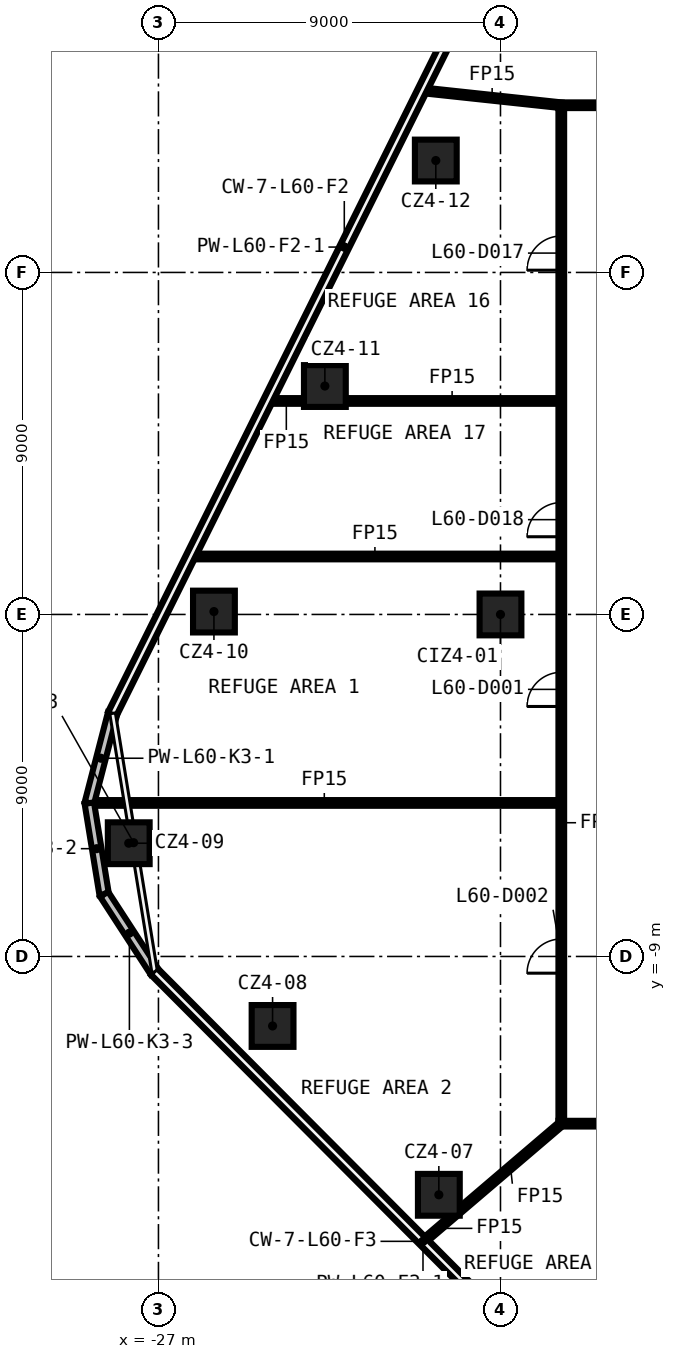
"""IFC4 building model, lengths in metres.
Left out: names, types, materials, properties, quantities, classifications, styles, units other than length and angle.
Written with IfcOpenShell. Run it as: python <this file> out.ifc"""

import sys

from ifc_helpers import new_model, si_unit, direction, frame, frame_2d, origin, origin_2d, place, context, subcontext, project, spatial, rectangle, extrude, element, fill, save


model = new_model("IFC4")
c1 = context("Model", 3, precision=1e-05, world=origin(), true_north=direction((0.0, 1.0)))
c2 = subcontext(c1, "Body", "Model", "MODEL_VIEW")
j1 = project(units=[si_unit("LENGTHUNIT", "METRE"), si_unit("PLANEANGLEUNIT", "RADIAN")], contexts=[c1])
p1 = place(None, origin())
s1 = spatial("IfcSite", under=j1, at=p1, CompositionType="ELEMENT")
p2 = place(p1, origin())
s2 = spatial("IfcBuilding", under=s1, at=p2, CompositionType="ELEMENT")
p3 = place(p2, frame((0.0, 0.0, 283.2)))
s3 = spatial("IfcBuildingStorey", under=s2, at=p3, CompositionType="ELEMENT", Elevation=283.2)
for number, where, z_axis, x_axis in (
    (1, (-19.622, -15.272, 0.0), (0.0, 0.0, 1.0), (1.0, 0.0, 0.0)),
    (2, (-23.997, -10.829, 0.0), (0.0, 0.0, 1.0), (1.0, 0.0, 0.0)),
    (3, (-27.782, -6.02, 0.0), (0.0, 0.0, 1.0), (1.0, 0.0, 0.0)),
    (4, (-25.54, 0.076, 0.0), (0.0, 0.0, 1.0), (1.0, 0.0, 0.0)),
    (5, (-22.621, 6.011, 0.0), (0.0, 0.0, 1.0), (1.0, 0.0, 0.0)),
    (6, (-19.702, 11.945, 0.0), (0.0, 0.0, 1.0), (1.0, 0.0, 0.0)),
    (7, (-18.0, 0.0, 0.0), (0.0, 0.0, 1.0), (1.0, 0.0, 0.0)),
):
    element("IfcColumn", number, at=place(p3, frame(where, z_axis=z_axis, x_axis=x_axis)), inside=s3, PredefinedType="COLUMN", context=c2, shape_type="SweptSolid", body=[
        extrude(rectangle(XDim=1.1, YDim=1.1, at=origin_2d()), origin(), (0.0, 0.0, 1.0), 5.55),
    ])
p4 = place(p3, frame((16.475, -13.4, 0.0), z_axis=(0.0, 0.0, 1.0), x_axis=(-1.0, 0.0, 0.0)))
e8 = element("IfcWall", 8, at=p4, inside=s3, PredefinedType="PARTITIONING", context=c2, shape_type="SweptSolid", body=[
    extrude(rectangle(XDim=32.95, YDim=0.15, at=frame_2d((16.475, 0.0))), origin(), (0.0, 0.0, 1.0), 5.55),
])
p5 = place(p4, frame((30.159, 0.0, 0.0)))
e9 = element("IfcOpeningElement", 9, at=p5, cuts=e8, PredefinedType="OPENING", context=c2, shape_type="SweptSolid", body=[
    extrude(rectangle(XDim=0.9, YDim=2.1, at=frame_2d((0.45, 1.05))), frame((0.0, 0.085, 0.0), z_axis=(0.0, -1.0, 0.0), x_axis=(1.0, 0.0, 0.0)), (0.0, 0.0, 1.0), 0.17),
])
p6 = place(p4, frame((24.091, 0.0, 0.0)))
e10 = element("IfcOpeningElement", 10, at=p6, cuts=e8, PredefinedType="OPENING", context=c2, shape_type="SweptSolid", body=[
    extrude(rectangle(XDim=0.9, YDim=2.1, at=frame_2d((0.45, 1.05))), frame((0.0, 0.085, 0.0), z_axis=(0.0, -1.0, 0.0), x_axis=(1.0, 0.0, 0.0)), (0.0, 0.0, 1.0), 0.17),
])
p7 = place(p4, frame((17.454, 0.0, 0.0)))
e11 = element("IfcOpeningElement", 11, at=p7, cuts=e8, PredefinedType="OPENING", context=c2, shape_type="SweptSolid", body=[
    extrude(rectangle(XDim=0.9, YDim=2.1, at=frame_2d((0.45, 1.05))), frame((0.0, 0.085, 0.0), z_axis=(0.0, -1.0, 0.0), x_axis=(1.0, 0.0, 0.0)), (0.0, 0.0, 1.0), 0.17),
])
p8 = place(p4, frame((12.504, 0.0, 0.0)))
e12 = element("IfcOpeningElement", 12, at=p8, cuts=e8, PredefinedType="OPENING", context=c2, shape_type="SweptSolid", body=[
    extrude(rectangle(XDim=0.9, YDim=2.1, at=frame_2d((0.45, 1.05))), frame((0.0, 0.085, 0.0), z_axis=(0.0, -1.0, 0.0), x_axis=(1.0, 0.0, 0.0)), (0.0, 0.0, 1.0), 0.17),
])
p9 = place(p4, frame((7.554, 0.0, 0.0)))
e13 = element("IfcOpeningElement", 13, at=p9, cuts=e8, PredefinedType="OPENING", context=c2, shape_type="SweptSolid", body=[
    extrude(rectangle(XDim=0.9, YDim=2.1, at=frame_2d((0.45, 1.05))), frame((0.0, 0.085, 0.0), z_axis=(0.0, -1.0, 0.0), x_axis=(1.0, 0.0, 0.0)), (0.0, 0.0, 1.0), 0.17),
])
p10 = place(p4, frame((2.438, 0.0, 0.0)))
e14 = element("IfcOpeningElement", 14, at=p10, cuts=e8, PredefinedType="OPENING", context=c2, shape_type="SweptSolid", body=[
    extrude(rectangle(XDim=0.9, YDim=2.1, at=frame_2d((0.45, 1.05))), frame((0.0, 0.085, 0.0), z_axis=(0.0, -1.0, 0.0), x_axis=(1.0, 0.0, 0.0)), (0.0, 0.0, 1.0), 0.17),
])
p11 = place(p3, frame((-28.797, -4.96, 0.0), z_axis=(0.0, 0.0, 1.0), x_axis=(1.0, 0.0, 0.0)))
e15 = element("IfcWall", 15, at=p11, inside=s3, PredefinedType="PARTITIONING", context=c2, shape_type="SweptSolid", body=[
    extrude(rectangle(XDim=12.322, YDim=0.15, at=frame_2d((6.161, 0.0))), origin(), (0.0, 0.0, 1.0), 5.55),
])
p12 = place(p3, frame((-26.133, 1.525, 0.0), z_axis=(0.0, 0.0, 1.0), x_axis=(1.0, 0.0, 0.0)))
e16 = element("IfcWall", 16, at=p12, inside=s3, PredefinedType="PARTITIONING", context=c2, shape_type="SweptSolid", body=[
    extrude(rectangle(XDim=9.658, YDim=0.15, at=frame_2d((4.829, 0.0))), origin(), (0.0, 0.0, 1.0), 5.55),
])
p13 = place(p3, frame((-24.099, 5.618, 0.0), z_axis=(0.0, 0.0, 1.0), x_axis=(1.0, 0.0, 0.0)))
e17 = element("IfcWall", 17, at=p13, inside=s3, PredefinedType="PARTITIONING", context=c2, shape_type="SweptSolid", body=[
    extrude(rectangle(XDim=0.928, YDim=0.15, at=frame_2d((0.464, 0.0))), origin(), (0.0, 0.0, 1.0), 5.55),
])
p14 = place(p3, frame((-22.071, 5.618, 0.0), z_axis=(0.0, 0.0, 1.0), x_axis=(1.0, 0.0, 0.0)))
e18 = element("IfcWall", 18, at=p14, inside=s3, PredefinedType="PARTITIONING", context=c2, shape_type="SweptSolid", body=[
    extrude(rectangle(XDim=5.596, YDim=0.15, at=frame_2d((2.798, 0.0))), origin(), (0.0, 0.0, 1.0), 5.55),
])
p15 = place(p3, frame((-16.475, 13.4, 0.0), z_axis=(0.0, 0.0, 1.0), x_axis=(1.0, 0.0, 0.0)))
e19 = element("IfcWall", 19, at=p15, inside=s3, PredefinedType="PARTITIONING", context=c2, shape_type="SweptSolid", body=[
    extrude(rectangle(XDim=32.95, YDim=0.15, at=frame_2d((16.475, 0.0))), origin(), (0.0, 0.0, 1.0), 5.55),
])
p16 = place(p15, frame((23.297, 0.0, 0.0)))
e20 = element("IfcOpeningElement", 20, at=p16, cuts=e19, PredefinedType="OPENING", context=c2, shape_type="SweptSolid", body=[
    extrude(rectangle(XDim=0.9, YDim=2.1, at=frame_2d((0.45, 1.05))), frame((0.0, 0.085, 0.0), z_axis=(0.0, -1.0, 0.0), x_axis=(1.0, 0.0, 0.0)), (0.0, 0.0, 1.0), 0.17),
])
p17 = place(p15, frame((17.452, 0.0, 0.0)))
e21 = element("IfcOpeningElement", 21, at=p17, cuts=e19, PredefinedType="OPENING", context=c2, shape_type="SweptSolid", body=[
    extrude(rectangle(XDim=0.9, YDim=2.1, at=frame_2d((0.45, 1.05))), frame((0.0, 0.085, 0.0), z_axis=(0.0, -1.0, 0.0), x_axis=(1.0, 0.0, 0.0)), (0.0, 0.0, 1.0), 0.17),
])
p18 = place(p15, frame((14.179, 0.0, 0.0)))
e22 = element("IfcOpeningElement", 22, at=p18, cuts=e19, PredefinedType="OPENING", context=c2, shape_type="SweptSolid", body=[
    extrude(rectangle(XDim=0.9, YDim=2.1, at=frame_2d((0.45, 1.05))), frame((0.0, 0.085, 0.0), z_axis=(0.0, -1.0, 0.0), x_axis=(1.0, 0.0, 0.0)), (0.0, 0.0, 1.0), 0.17),
])
p19 = place(p15, frame((7.517, 0.0, 0.0)))
e23 = element("IfcOpeningElement", 23, at=p19, cuts=e19, PredefinedType="OPENING", context=c2, shape_type="SweptSolid", body=[
    extrude(rectangle(XDim=0.9, YDim=2.1, at=frame_2d((0.45, 1.05))), frame((0.0, 0.085, 0.0), z_axis=(0.0, -1.0, 0.0), x_axis=(1.0, 0.0, 0.0)), (0.0, 0.0, 1.0), 0.17),
])
p20 = place(p3, frame((-20.019, -16.489, 0.0), z_axis=(0.0, 0.0, 1.0), x_axis=(0.760647520032, 0.649165117877, 0.0)))
e24 = element("IfcWall", 24, at=p20, inside=s3, PredefinedType="PARTITIONING", context=c2, shape_type="SweptSolid", body=[
    extrude(rectangle(XDim=1.027, YDim=0.15, at=frame_2d((0.514, 0.0))), origin(), (0.0, 0.0, 1.0), 5.55),
])
p21 = place(p3, frame((-19.072, -15.681, 0.0), z_axis=(0.0, 0.0, 1.0), x_axis=(0.760643176825, 0.649170206918, 0.0)))
e25 = element("IfcWall", 25, at=p21, inside=s3, PredefinedType="PARTITIONING", context=c2, shape_type="SweptSolid", body=[
    extrude(rectangle(XDim=3.513, YDim=0.15, at=frame_2d((1.756, 0.0))), origin(), (0.0, 0.0, 1.0), 5.55),
])
p22 = place(p3, frame((-16.4, -13.325, 0.0), z_axis=(0.0, 0.0, 1.0), x_axis=(0.0, 1.0, 0.0)))
e26 = element("IfcWall", 26, at=p22, inside=s3, PredefinedType="PARTITIONING", context=c2, shape_type="SweptSolid", body=[
    extrude(rectangle(XDim=26.65, YDim=0.15, at=frame_2d((13.325, 0.0))), origin(), (0.0, 0.0, 1.0), 5.55),
])
p23 = place(p22, frame((10.903, 0.0, 0.0)))
e27 = element("IfcOpeningElement", 27, at=p23, cuts=e26, PredefinedType="OPENING", context=c2, shape_type="SweptSolid", body=[
    extrude(rectangle(XDim=0.9, YDim=2.1, at=frame_2d((0.45, 1.05))), frame((0.0, 0.085, 0.0), z_axis=(0.0, -1.0, 0.0), x_axis=(1.0, 0.0, 0.0)), (0.0, 0.0, 1.0), 0.17),
])
p24 = place(p22, frame((3.885, 0.0, 0.0)))
e28 = element("IfcOpeningElement", 28, at=p24, cuts=e26, PredefinedType="OPENING", context=c2, shape_type="SweptSolid", body=[
    extrude(rectangle(XDim=0.9, YDim=2.1, at=frame_2d((0.45, 1.05))), frame((0.0, 0.085, 0.0), z_axis=(0.0, -1.0, 0.0), x_axis=(1.0, 0.0, 0.0)), (0.0, 0.0, 1.0), 0.17),
])
p25 = place(p22, frame((22.384, 0.0, 0.0)))
e29 = element("IfcOpeningElement", 29, at=p25, cuts=e26, PredefinedType="OPENING", context=c2, shape_type="SweptSolid", body=[
    extrude(rectangle(XDim=0.9, YDim=2.1, at=frame_2d((0.45, 1.05))), frame((0.0, 0.085, 0.0), z_axis=(0.0, -1.0, 0.0), x_axis=(1.0, 0.0, 0.0)), (0.0, 0.0, 1.0), 0.17),
])
p26 = place(p22, frame((15.37, 0.0, 0.0)))
e30 = element("IfcOpeningElement", 30, at=p26, cuts=e26, PredefinedType="OPENING", context=c2, shape_type="SweptSolid", body=[
    extrude(rectangle(XDim=0.9, YDim=2.1, at=frame_2d((0.45, 1.05))), frame((0.0, 0.085, 0.0), z_axis=(0.0, -1.0, 0.0), x_axis=(1.0, 0.0, 0.0)), (0.0, 0.0, 1.0), 0.17),
])
p27 = place(p3, frame((-20.039, 13.791, 0.0), z_axis=(0.0, 0.0, 1.0), x_axis=(0.994280601319, -0.106799278277, 0.0)))
e31 = element("IfcWall", 31, at=p27, inside=s3, PredefinedType="PARTITIONING", context=c2, shape_type="SweptSolid", body=[
    extrude(rectangle(XDim=3.66, YDim=0.15, at=frame_2d((1.83, 0.0))), origin(), (0.0, 0.0, 1.0), 5.55),
])
p28 = place(p3, frame((-16.013, 21.938, 0.0), z_axis=(0.0, 0.0, 1.0), x_axis=(-0.444956387573, -0.895552239212, 0.0)))
e32 = element("IfcWall", 32, at=p28, inside=s3, PredefinedType="SOLIDWALL", context=c2, shape_type="SweptSolid", body=[
    extrude(rectangle(XDim=27.404, YDim=0.25, at=frame_2d((13.702, 0.0))), origin(), (0.0, 0.0, 1.0), 5.55),
])
p29 = place(p3, frame((-28.207, -2.603, 0.0), z_axis=(0.0, 0.0, 1.0), x_axis=(-0.251048970214, -0.967974387344, 0.0)))
e33 = element("IfcWall", 33, at=p29, inside=s3, PredefinedType="SOLIDWALL", context=c2, shape_type="SweptSolid", body=[
    extrude(rectangle(XDim=2.44, YDim=0.25, at=frame_2d((1.22, 0.0))), origin(), (0.0, 0.0, 1.0), 5.55),
])
p30 = place(p3, frame((-28.819, -4.965, 0.0), z_axis=(0.0, 0.0, 1.0), x_axis=(0.160486632868, -0.987038013792, 0.0)))
e34 = element("IfcWall", 34, at=p30, inside=s3, PredefinedType="SOLIDWALL", context=c2, shape_type="SweptSolid", body=[
    extrude(rectangle(XDim=2.429, YDim=0.25, at=frame_2d((1.215, 0.0))), origin(), (0.0, 0.0, 1.0), 5.55),
])
p31 = place(p3, frame((-28.429, -7.363, 0.0), z_axis=(0.0, 0.0, 1.0), x_axis=(0.544731578252, -0.838610462405, 0.0)))
e35 = element("IfcWall", 35, at=p31, inside=s3, PredefinedType="SOLIDWALL", context=c2, shape_type="SweptSolid", body=[
    extrude(rectangle(XDim=2.44, YDim=0.25, at=frame_2d((1.22, 0.0))), origin(), (0.0, 0.0, 1.0), 5.55),
])
p32 = place(p3, frame((-27.1, -9.409, 0.0), z_axis=(0.0, 0.0, 1.0), x_axis=(0.705769458317, -0.7084415796, 0.0)))
e36 = element("IfcWall", 36, at=p32, inside=s3, PredefinedType="SOLIDWALL", context=c2, shape_type="SweptSolid", body=[
    extrude(rectangle(XDim=20.009, YDim=0.25, at=frame_2d((10.004, 0.0))), origin(), (0.0, 0.0, 1.0), 5.55),
])
p33 = place(p23, origin())
e37 = element("IfcDoor", 37, at=p33, inside=s3, OperationType="SINGLE_SWING_RIGHT", PredefinedType="DOOR", context=c2, shape_type="SweptSolid", body=[
    extrude(rectangle(XDim=0.9, YDim=2.1, at=frame_2d((0.45, 1.05))), frame((0.0, 0.025, 0.0), z_axis=(0.0, -1.0, 0.0), x_axis=(1.0, 0.0, 0.0)), (0.0, 0.0, 1.0), 0.05),
])
fill(e27, e37)
p34 = place(p24, origin())
e38 = element("IfcDoor", 38, at=p34, inside=s3, OperationType="SINGLE_SWING_LEFT", PredefinedType="DOOR", context=c2, shape_type="SweptSolid", body=[
    extrude(rectangle(XDim=0.9, YDim=2.1, at=frame_2d((0.45, 1.05))), frame((0.0, 0.025, 0.0), z_axis=(0.0, -1.0, 0.0), x_axis=(1.0, 0.0, 0.0)), (0.0, 0.0, 1.0), 0.05),
])
fill(e28, e38)
p35 = place(p25, origin())
e39 = element("IfcDoor", 39, at=p35, inside=s3, OperationType="SINGLE_SWING_RIGHT", PredefinedType="DOOR", context=c2, shape_type="SweptSolid", body=[
    extrude(rectangle(XDim=0.9, YDim=2.1, at=frame_2d((0.45, 1.05))), frame((0.0, 0.025, 0.0), z_axis=(0.0, -1.0, 0.0), x_axis=(1.0, 0.0, 0.0)), (0.0, 0.0, 1.0), 0.05),
])
fill(e29, e39)
p36 = place(p26, origin())
e40 = element("IfcDoor", 40, at=p36, inside=s3, OperationType="SINGLE_SWING_LEFT", PredefinedType="DOOR", context=c2, shape_type="SweptSolid", body=[
    extrude(rectangle(XDim=0.9, YDim=2.1, at=frame_2d((0.45, 1.05))), frame((0.0, 0.025, 0.0), z_axis=(0.0, -1.0, 0.0), x_axis=(1.0, 0.0, 0.0)), (0.0, 0.0, 1.0), 0.05),
])
fill(e30, e40)
save(model, sys.argv[1])
